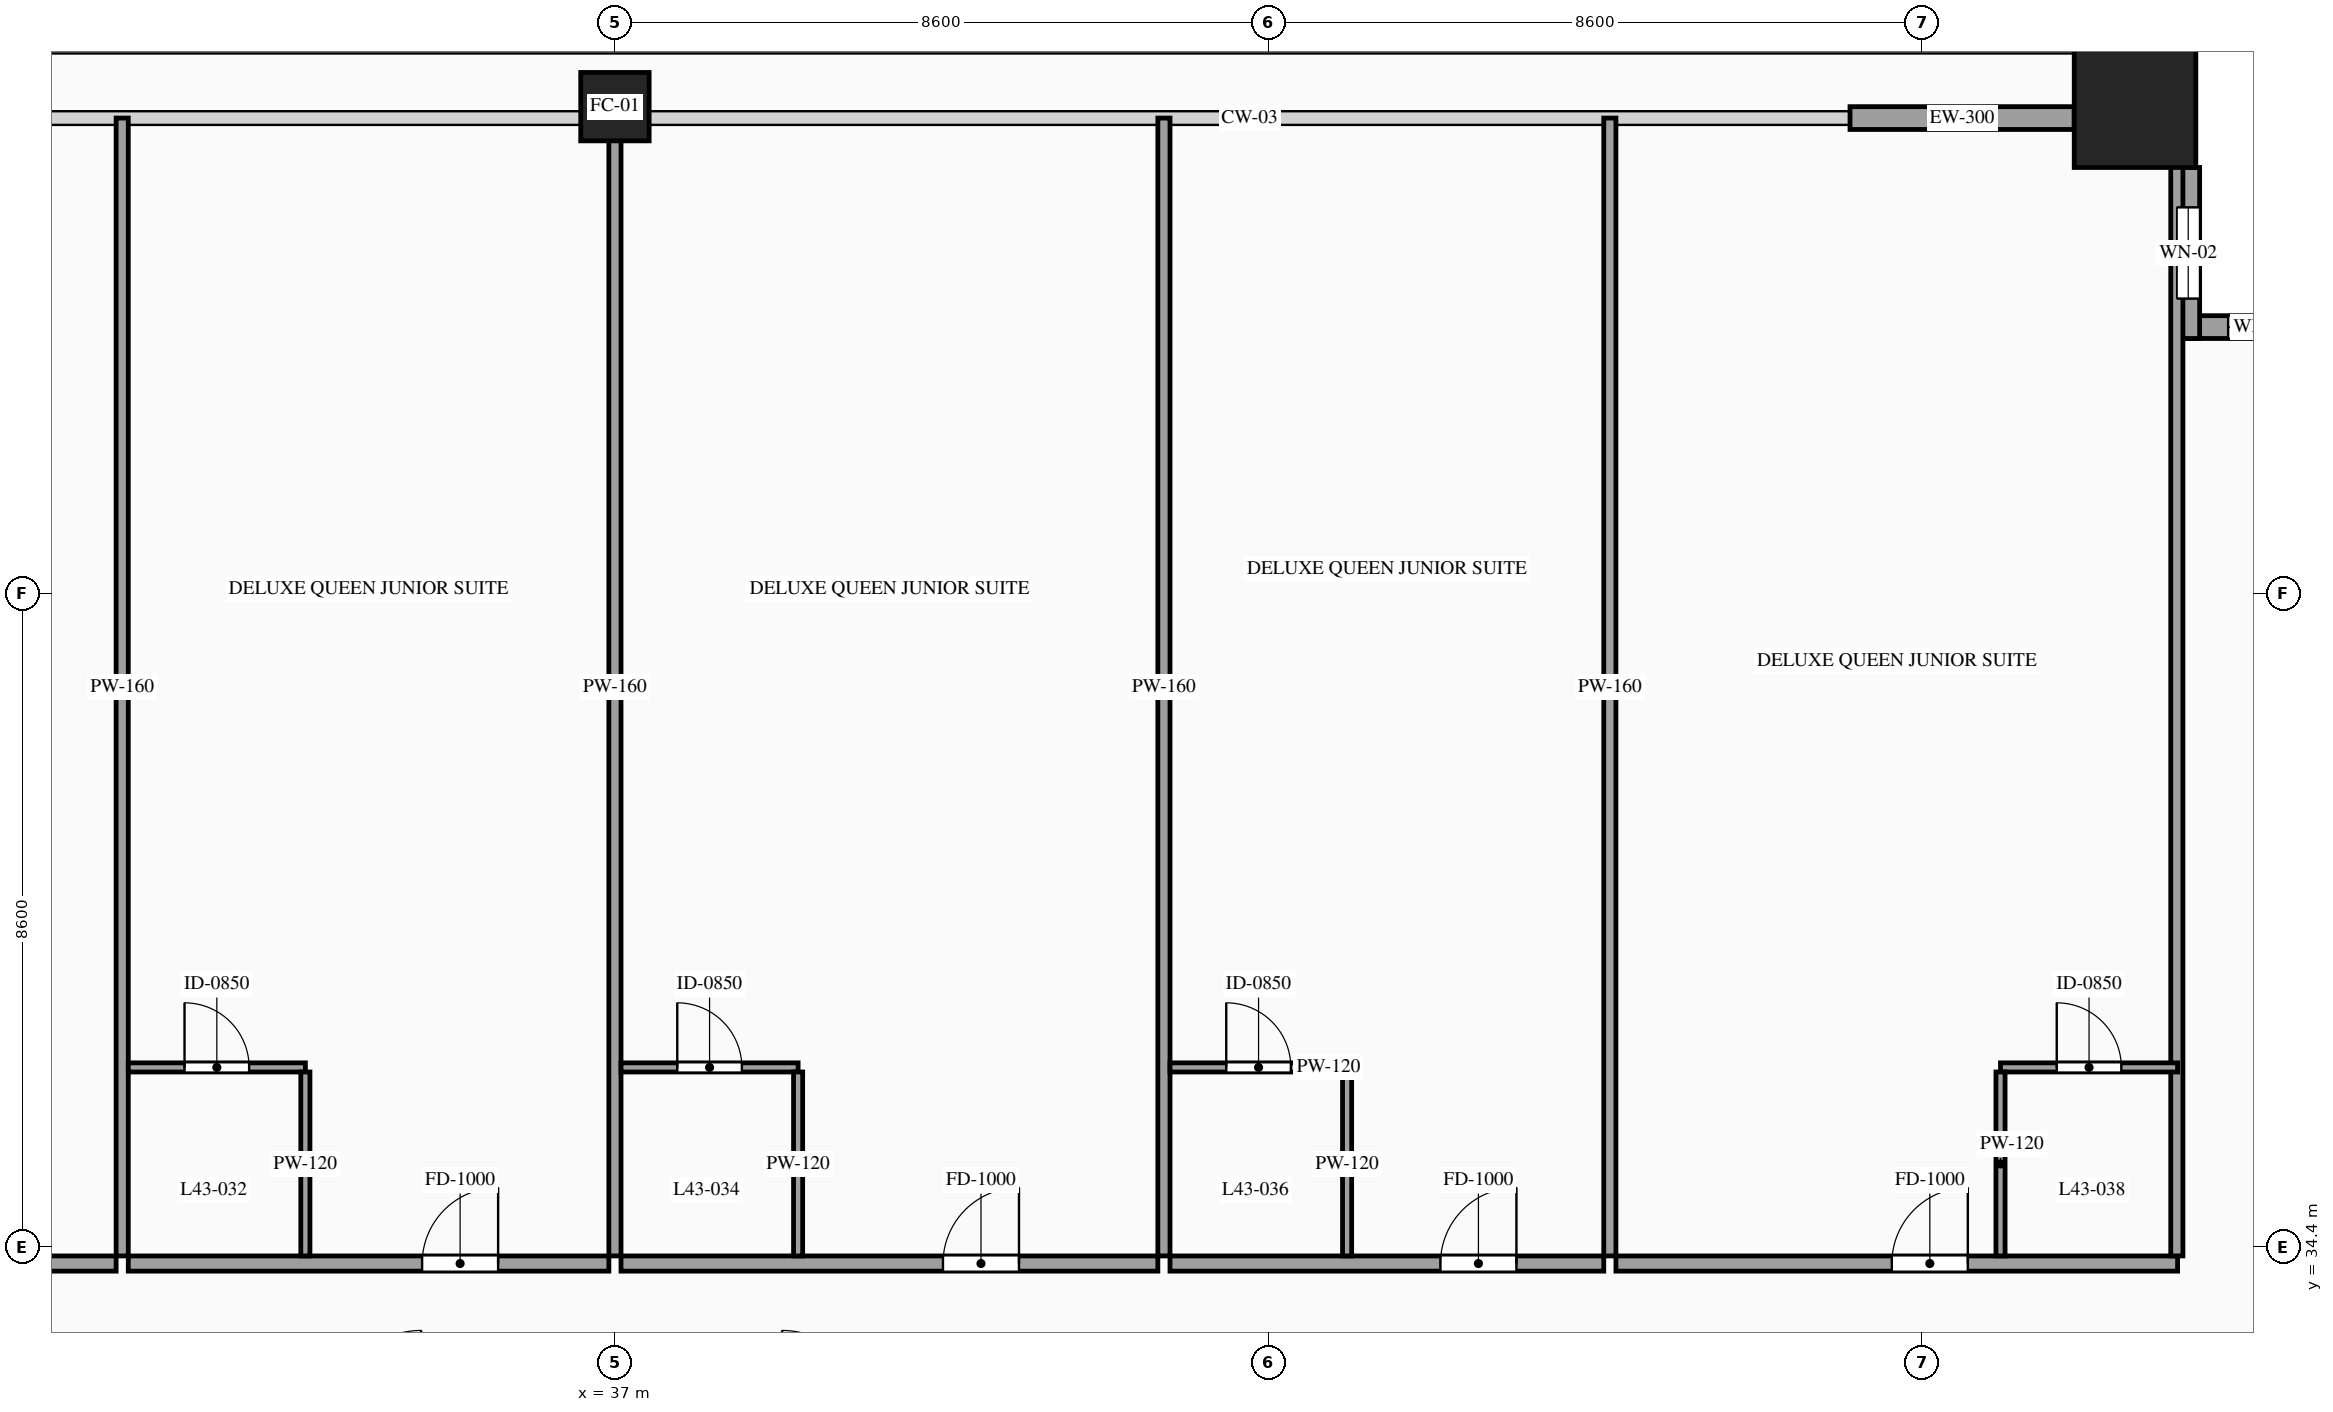
"""IFC4 building model, lengths in metres.
Left out: names, types, materials, properties, quantities, classifications, styles, units other than length and angle.
Written with IfcOpenShell. Run it as: python <this file> out.ifc"""

import sys

from ifc_helpers import new_model, si_unit, direction, frame, frame_2d, origin, origin_2d, place, context, subcontext, project, spatial, rectangle, hollow_rectangle, extrude, source, transform, mapped, element, fill, save


model = new_model("IFC4")
c1 = context("Model", 3, precision=1e-05, world=origin(), true_north=direction((0.0, 1.0)))
c2 = subcontext(c1, "Body", "Model", "MODEL_VIEW")
j1 = project(units=[si_unit("LENGTHUNIT", "METRE"), si_unit("PLANEANGLEUNIT", "RADIAN")], contexts=[c1])
p1 = place(None, origin())
s1 = spatial("IfcSite", under=j1, at=p1, CompositionType="ELEMENT")
p2 = place(p1, origin())
s2 = spatial("IfcBuilding", under=s1, at=p2, CompositionType="ELEMENT")
p3 = place(p2, frame((0.0, 0.0, 163.2)))
s3 = spatial("IfcBuildingStorey", under=s2, at=p3, CompositionType="ELEMENT", Elevation=163.2)
m1 = source(origin(), c2, "Body", "SweptSolid", [
    extrude(hollow_rectangle(XDim=0.9, YDim=0.9, WallThickness=0.042, at=origin_2d()), origin(), (0.0, 0.0, 1.0), 3.3),
])
p4 = place(p3, frame((37.0, 49.4, 0.0), z_axis=(0.0, 0.0, 1.0), x_axis=(1.0, 0.0, 0.0)))
e1 = element("IfcColumn", 1, at=p4, inside=s3, PredefinedType="COLUMN", context=c2, shape_type="MappedRepresentation", body=[
    mapped(m1, transform((0.0, 0.0, 0.0), scale=1.0)),
])
m2 = source(origin(), c2, "Body", "SweptSolid", [
    extrude(hollow_rectangle(XDim=1.6, YDim=1.6, WallThickness=0.07, at=origin_2d()), origin(), (0.0, 0.0, 1.0), 3.3),
])
p5 = place(p3, frame((57.0, 49.4, 0.0), z_axis=(0.0, 0.0, 1.0), x_axis=(1.0, 0.0, 0.0)))
e2 = element("IfcColumn", 2, at=p5, inside=s3, PredefinedType="COLUMN", context=c2, shape_type="MappedRepresentation", body=[
    mapped(m2, transform((0.0, 0.0, 0.0), scale=1.0)),
])
p6 = place(p3, frame((59.8, 46.5, 0.0), z_axis=(0.0, 0.0, 1.0), x_axis=(-1.0, 0.0, 0.0)))
e3 = element("IfcWall", 3, at=p6, inside=s3, PredefinedType="SOLIDWALL", context=c2, shape_type="SweptSolid", body=[
    extrude(rectangle(XDim=2.25, YDim=0.3, at=frame_2d((1.125, 0.0))), origin(), (0.0, 0.0, 1.0), 3.3),
])
p7 = place(p6, frame((0.675, 0.0, 0.85)))
e4 = element("IfcOpeningElement", 4, at=p7, cuts=e3, PredefinedType="OPENING", context=c2, shape_type="SweptSolid", body=[
    extrude(rectangle(XDim=0.9, YDim=1.5, at=frame_2d((0.45, 0.75))), frame((0.0, 0.165, 0.0), z_axis=(0.0, -1.0, 0.0), x_axis=(1.0, 0.0, 0.0)), (0.0, 0.0, 1.0), 0.33),
])
p8 = place(p3, frame((57.7, 46.35, 0.0), z_axis=(0.0, 0.0, 1.0), x_axis=(0.0, 1.0, 0.0)))
e5 = element("IfcWall", 5, at=p8, inside=s3, PredefinedType="SOLIDWALL", context=c2, shape_type="SweptSolid", body=[
    extrude(rectangle(XDim=2.25, YDim=0.3, at=frame_2d((1.125, 0.0))), origin(), (0.0, 0.0, 1.0), 3.3),
])
p9 = place(p8, frame((0.525, 0.0, 0.85)))
e6 = element("IfcOpeningElement", 6, at=p9, cuts=e5, PredefinedType="OPENING", context=c2, shape_type="SweptSolid", body=[
    extrude(rectangle(XDim=1.2, YDim=2.1, at=frame_2d((0.6, 1.05))), frame((0.0, 0.165, 0.0), z_axis=(0.0, -1.0, 0.0), x_axis=(1.0, 0.0, 0.0)), (0.0, 0.0, 1.0), 0.33),
])
m3 = source(origin(), c2, "Body", "SweptSolid", [
    extrude(rectangle(XDim=2.95, YDim=0.3, at=frame_2d((1.475, 0.0))), origin(), (0.0, 0.0, 1.0), 2.695),
])
p10 = place(p3, frame((53.25, 49.25, 0.0), z_axis=(0.0, 0.0, 1.0), x_axis=(1.0, 0.0, 0.0)))
e7 = element("IfcWall", 7, at=p10, inside=s3, PredefinedType="SOLIDWALL", context=c2, shape_type="MappedRepresentation", body=[
    mapped(m3, transform((0.0, 0.0, 0.0), scale=1.0)),
])
p11 = place(p3, frame((22.757, 34.18, 0.0), z_axis=(0.0, 0.0, 1.0), x_axis=(1.0, 0.0, 0.0)))
e8 = element("IfcWall", 8, at=p11, inside=s3, PredefinedType="PARTITIONING", context=c2, shape_type="SweptSolid", body=[
    extrude(rectangle(XDim=7.68, YDim=0.2, at=frame_2d((3.84, 0.0))), origin(), (0.0, 0.0, 1.0), 3.3),
])
p12 = place(p11, frame((4.545, 0.0, 0.0)))
e9 = element("IfcOpeningElement", 9, at=p12, cuts=e8, PredefinedType="OPENING", context=c2, shape_type="SweptSolid", body=[
    extrude(rectangle(XDim=1.0, YDim=2.2, at=frame_2d((0.5, 1.1))), frame((0.0, 0.115, 0.0), z_axis=(0.0, -1.0, 0.0), x_axis=(1.0, 0.0, 0.0)), (0.0, 0.0, 1.0), 0.23),
])
m4 = source(origin(), c2, "Body", "SweptSolid", [
    extrude(rectangle(XDim=14.97, YDim=0.16, at=frame_2d((7.485, 0.0))), origin(), (0.0, 0.0, 1.0), 3.3),
])
p13 = place(p3, frame((30.517, 34.28, 0.0), z_axis=(0.0, 0.0, 1.0), x_axis=(0.0, 1.0, 0.0)))
e10 = element("IfcWall", 10, at=p13, inside=s3, PredefinedType="PARTITIONING", context=c2, shape_type="MappedRepresentation", body=[
    mapped(m4, transform((0.0, 0.0, 0.0), scale=1.0)),
])
p14 = place(p3, frame((30.597, 34.18, 0.0), z_axis=(0.0, 0.0, 1.0), x_axis=(1.0, 0.0, 0.0)))
e11 = element("IfcWall", 11, at=p14, inside=s3, PredefinedType="PARTITIONING", context=c2, shape_type="SweptSolid", body=[
    extrude(rectangle(XDim=6.323, YDim=0.2, at=frame_2d((3.162, 0.0))), origin(), (0.0, 0.0, 1.0), 3.3),
])
p15 = place(p14, frame((3.866, 0.0, 0.0)))
e12 = element("IfcOpeningElement", 12, at=p15, cuts=e11, PredefinedType="OPENING", context=c2, shape_type="SweptSolid", body=[
    extrude(rectangle(XDim=1.0, YDim=2.2, at=frame_2d((0.5, 1.1))), frame((0.0, 0.115, 0.0), z_axis=(0.0, -1.0, 0.0), x_axis=(1.0, 0.0, 0.0)), (0.0, 0.0, 1.0), 0.23),
])
m5 = source(origin(), c2, "Body", "SweptSolid", [
    extrude(rectangle(XDim=14.97, YDim=0.16, at=frame_2d((7.485, 0.0))), origin(), (0.0, 0.0, 1.0), 1.695),
])
p16 = place(p3, frame((37.0, 34.28, 0.0), z_axis=(0.0, 0.0, 1.0), x_axis=(0.0, 1.0, 0.0)))
e13 = element("IfcWall", 13, at=p16, inside=s3, PredefinedType="PARTITIONING", context=c2, shape_type="MappedRepresentation", body=[
    mapped(m5, transform((0.0, 0.0, 0.0), scale=1.0)),
])
p17 = place(p3, frame((30.597, 36.76, 0.0), z_axis=(0.0, 0.0, 1.0), x_axis=(1.0, 0.0, 0.0)))
e14 = element("IfcWall", 14, at=p17, inside=s3, PredefinedType="PARTITIONING", context=c2, shape_type="SweptSolid", body=[
    extrude(rectangle(XDim=2.33, YDim=0.12, at=frame_2d((1.165, 0.0))), origin(), (0.0, 0.0, 1.0), 3.3),
])
p18 = place(p17, frame((0.74, 0.0, 0.0)))
e15 = element("IfcOpeningElement", 15, at=p18, cuts=e14, PredefinedType="OPENING", context=c2, shape_type="SweptSolid", body=[
    extrude(rectangle(XDim=0.85, YDim=2.1, at=frame_2d((0.425, 1.05))), frame((0.0, 0.075, 0.0), z_axis=(0.0, -1.0, 0.0), x_axis=(1.0, 0.0, 0.0)), (0.0, 0.0, 1.0), 0.15),
])
m6 = source(origin(), c2, "Body", "SweptSolid", [
    extrude(rectangle(XDim=2.42, YDim=0.12, at=frame_2d((1.21, 0.0))), origin(), (0.0, 0.0, 1.0), 3.3),
])
p19 = place(p3, frame((32.927, 34.28, 0.0), z_axis=(0.0, 0.0, 1.0), x_axis=(0.0, 1.0, 0.0)))
e16 = element("IfcWall", 16, at=p19, inside=s3, PredefinedType="PARTITIONING", context=c2, shape_type="MappedRepresentation", body=[
    mapped(m6, transform((0.0, 0.0, 0.0), scale=1.0)),
])
p20 = place(p3, frame((37.08, 34.18, 0.0), z_axis=(0.0, 0.0, 1.0), x_axis=(1.0, 0.0, 0.0)))
e17 = element("IfcWall", 17, at=p20, inside=s3, PredefinedType="PARTITIONING", context=c2, shape_type="SweptSolid", body=[
    extrude(rectangle(XDim=7.063, YDim=0.2, at=frame_2d((3.531, 0.0))), origin(), (0.0, 0.0, 1.0), 3.3),
])
p21 = place(p20, frame((4.236, 0.0, 0.0)))
e18 = element("IfcOpeningElement", 18, at=p21, cuts=e17, PredefinedType="OPENING", context=c2, shape_type="SweptSolid", body=[
    extrude(rectangle(XDim=1.0, YDim=2.2, at=frame_2d((0.5, 1.1))), frame((0.0, 0.115, 0.0), z_axis=(0.0, -1.0, 0.0), x_axis=(1.0, 0.0, 0.0)), (0.0, 0.0, 1.0), 0.23),
])
p22 = place(p3, frame((44.223, 34.28, 0.0), z_axis=(0.0, 0.0, 1.0), x_axis=(0.0, 1.0, 0.0)))
e19 = element("IfcWall", 19, at=p22, inside=s3, PredefinedType="PARTITIONING", context=c2, shape_type="MappedRepresentation", body=[
    mapped(m4, transform((0.0, 0.0, 0.0), scale=1.0)),
])
p23 = place(p3, frame((37.08, 36.76, 0.0), z_axis=(0.0, 0.0, 1.0), x_axis=(1.0, 0.0, 0.0)))
e20 = element("IfcWall", 20, at=p23, inside=s3, PredefinedType="PARTITIONING", context=c2, shape_type="SweptSolid", body=[
    extrude(rectangle(XDim=2.33, YDim=0.12, at=frame_2d((1.165, 0.0))), origin(), (0.0, 0.0, 1.0), 3.3),
])
p24 = place(p23, frame((0.74, 0.0, 0.0)))
e21 = element("IfcOpeningElement", 21, at=p24, cuts=e20, PredefinedType="OPENING", context=c2, shape_type="SweptSolid", body=[
    extrude(rectangle(XDim=0.85, YDim=2.1, at=frame_2d((0.425, 1.05))), frame((0.0, 0.075, 0.0), z_axis=(0.0, -1.0, 0.0), x_axis=(1.0, 0.0, 0.0)), (0.0, 0.0, 1.0), 0.15),
])
p25 = place(p3, frame((39.41, 34.28, 0.0), z_axis=(0.0, 0.0, 1.0), x_axis=(0.0, 1.0, 0.0)))
e22 = element("IfcWall", 22, at=p25, inside=s3, PredefinedType="PARTITIONING", context=c2, shape_type="MappedRepresentation", body=[
    mapped(m6, transform((0.0, 0.0, 0.0), scale=1.0)),
])
p26 = place(p3, frame((44.303, 34.18, 0.0), z_axis=(0.0, 0.0, 1.0), x_axis=(1.0, 0.0, 0.0)))
e23 = element("IfcWall", 23, at=p26, inside=s3, PredefinedType="PARTITIONING", context=c2, shape_type="SweptSolid", body=[
    extrude(rectangle(XDim=5.707, YDim=0.2, at=frame_2d((2.854, 0.0))), origin(), (0.0, 0.0, 1.0), 3.3),
])
p27 = place(p26, frame((3.558, 0.0, 0.0)))
e24 = element("IfcOpeningElement", 24, at=p27, cuts=e23, PredefinedType="OPENING", context=c2, shape_type="SweptSolid", body=[
    extrude(rectangle(XDim=1.0, YDim=2.2, at=frame_2d((0.5, 1.1))), frame((0.0, 0.115, 0.0), z_axis=(0.0, -1.0, 0.0), x_axis=(1.0, 0.0, 0.0)), (0.0, 0.0, 1.0), 0.23),
])
p28 = place(p3, frame((50.09, 34.28, 0.0), z_axis=(0.0, 0.0, 1.0), x_axis=(0.0, 1.0, 0.0)))
e25 = element("IfcWall", 25, at=p28, inside=s3, PredefinedType="PARTITIONING", context=c2, shape_type="MappedRepresentation", body=[
    mapped(m4, transform((0.0, 0.0, 0.0), scale=1.0)),
])
p29 = place(p3, frame((44.303, 36.76, 0.0), z_axis=(0.0, 0.0, 1.0), x_axis=(1.0, 0.0, 0.0)))
e26 = element("IfcWall", 26, at=p29, inside=s3, PredefinedType="PARTITIONING", context=c2, shape_type="SweptSolid", body=[
    extrude(rectangle(XDim=2.33, YDim=0.12, at=frame_2d((1.165, 0.0))), origin(), (0.0, 0.0, 1.0), 3.3),
])
p30 = place(p29, frame((0.74, 0.0, 0.0)))
e27 = element("IfcOpeningElement", 27, at=p30, cuts=e26, PredefinedType="OPENING", context=c2, shape_type="SweptSolid", body=[
    extrude(rectangle(XDim=0.85, YDim=2.1, at=frame_2d((0.425, 1.05))), frame((0.0, 0.075, 0.0), z_axis=(0.0, -1.0, 0.0), x_axis=(1.0, 0.0, 0.0)), (0.0, 0.0, 1.0), 0.15),
])
p31 = place(p3, frame((46.633, 34.28, 0.0), z_axis=(0.0, 0.0, 1.0), x_axis=(0.0, 1.0, 0.0)))
e28 = element("IfcWall", 28, at=p31, inside=s3, PredefinedType="PARTITIONING", context=c2, shape_type="MappedRepresentation", body=[
    mapped(m6, transform((0.0, 0.0, 0.0), scale=1.0)),
])
p32 = place(p3, frame((50.17, 34.18, 0.0), z_axis=(0.0, 0.0, 1.0), x_axis=(1.0, 0.0, 0.0)))
e29 = element("IfcWall", 29, at=p32, inside=s3, PredefinedType="PARTITIONING", context=c2, shape_type="SweptSolid", body=[
    extrude(rectangle(XDim=7.39, YDim=0.2, at=frame_2d((3.695, 0.0))), origin(), (0.0, 0.0, 1.0), 3.3),
])
p33 = place(p32, frame((3.63, 0.0, 0.0)))
e30 = element("IfcOpeningElement", 30, at=p33, cuts=e29, PredefinedType="OPENING", context=c2, shape_type="SweptSolid", body=[
    extrude(rectangle(XDim=1.0, YDim=2.2, at=frame_2d((0.5, 1.1))), frame((0.0, 0.115, 0.0), z_axis=(0.0, -1.0, 0.0), x_axis=(1.0, 0.0, 0.0)), (0.0, 0.0, 1.0), 0.23),
])
m7 = source(origin(), c2, "Body", "SweptSolid", [
    extrude(rectangle(XDim=14.82, YDim=0.16, at=frame_2d((7.41, 0.0))), origin(), (0.0, 0.0, 1.0), 3.3),
])
p34 = place(p3, frame((57.55, 34.28, 0.0), z_axis=(0.0, 0.0, 1.0), x_axis=(0.0, 1.0, 0.0)))
e31 = element("IfcWall", 31, at=p34, inside=s3, PredefinedType="PARTITIONING", context=c2, shape_type="MappedRepresentation", body=[
    mapped(m7, transform((0.0, 0.0, 0.0), scale=1.0)),
])
p35 = place(p3, frame((55.23, 36.76, 0.0), z_axis=(0.0, 0.0, 1.0), x_axis=(1.0, 0.0, 0.0)))
e32 = element("IfcWall", 32, at=p35, inside=s3, PredefinedType="PARTITIONING", context=c2, shape_type="SweptSolid", body=[
    extrude(rectangle(XDim=2.33, YDim=0.12, at=frame_2d((1.165, 0.0))), origin(), (0.0, 0.0, 1.0), 3.3),
])
p36 = place(p35, frame((0.74, 0.0, 0.0)))
e33 = element("IfcOpeningElement", 33, at=p36, cuts=e32, PredefinedType="OPENING", context=c2, shape_type="SweptSolid", body=[
    extrude(rectangle(XDim=0.85, YDim=2.1, at=frame_2d((0.425, 1.05))), frame((0.0, 0.075, 0.0), z_axis=(0.0, -1.0, 0.0), x_axis=(1.0, 0.0, 0.0)), (0.0, 0.0, 1.0), 0.15),
])
p37 = place(p3, frame((55.23, 34.28, 0.0), z_axis=(0.0, 0.0, 1.0), x_axis=(0.0, 1.0, 0.0)))
e34 = element("IfcWall", 34, at=p37, inside=s3, PredefinedType="PARTITIONING", context=c2, shape_type="MappedRepresentation", body=[
    mapped(m6, transform((0.0, 0.0, 0.0), scale=1.0)),
])
m8 = source(origin(), c2, "Body", "SweptSolid", [
    extrude(rectangle(XDim=0.9, YDim=1.5, at=frame_2d((0.45, 0.75))), frame((0.0, 0.03, 0.0), z_axis=(0.0, -1.0, 0.0), x_axis=(1.0, 0.0, 0.0)), (0.0, 0.0, 1.0), 0.06),
])
p38 = place(p7, origin())
e35 = element("IfcWindow", 35, at=p38, inside=s3, PartitioningType="SINGLE_PANEL", PredefinedType="WINDOW", context=c2, shape_type="MappedRepresentation", body=[
    mapped(m8, transform((0.0, 0.0, 0.0), scale=1.0)),
])
fill(e4, e35)
m9 = source(origin(), c2, "Body", "SweptSolid", [
    extrude(rectangle(XDim=1.2, YDim=2.1, at=frame_2d((0.6, 1.05))), frame((0.0, 0.03, 0.0), z_axis=(0.0, -1.0, 0.0), x_axis=(1.0, 0.0, 0.0)), (0.0, 0.0, 1.0), 0.06),
])
p39 = place(p9, origin())
e36 = element("IfcWindow", 36, at=p39, inside=s3, PartitioningType="SINGLE_PANEL", PredefinedType="WINDOW", context=c2, shape_type="MappedRepresentation", body=[
    mapped(m9, transform((0.0, 0.0, 0.0), scale=1.0)),
])
fill(e6, e36)
m10 = source(origin(), c2, "Body", "SweptSolid", [
    extrude(rectangle(XDim=1.0, YDim=2.2, at=frame_2d((0.5, 1.1))), frame((0.0, 0.025, 0.0), z_axis=(0.0, -1.0, 0.0), x_axis=(1.0, 0.0, 0.0)), (0.0, 0.0, 1.0), 0.05),
])
p40 = place(p15, origin())
e37 = element("IfcDoor", 37, at=p40, inside=s3, OperationType="SINGLE_SWING_RIGHT", PredefinedType="DOOR", context=c2, shape_type="MappedRepresentation", body=[
    mapped(m10, transform((0.0, 0.0, 0.0), scale=1.0)),
])
fill(e12, e37)
m11 = source(origin(), c2, "Body", "SweptSolid", [
    extrude(rectangle(XDim=0.85, YDim=2.1, at=frame_2d((0.425, 1.05))), frame((0.0, 0.025, 0.0), z_axis=(0.0, -1.0, 0.0), x_axis=(1.0, 0.0, 0.0)), (0.0, 0.0, 1.0), 0.05),
])
p41 = place(p18, origin())
e38 = element("IfcDoor", 38, at=p41, inside=s3, OperationType="SINGLE_SWING_LEFT", PredefinedType="DOOR", context=c2, shape_type="MappedRepresentation", body=[
    mapped(m11, transform((0.0, 0.0, 0.0), scale=1.0)),
])
fill(e15, e38)
p42 = place(p21, origin())
e39 = element("IfcDoor", 39, at=p42, inside=s3, OperationType="SINGLE_SWING_RIGHT", PredefinedType="DOOR", context=c2, shape_type="MappedRepresentation", body=[
    mapped(m10, transform((0.0, 0.0, 0.0), scale=1.0)),
])
fill(e18, e39)
p43 = place(p24, origin())
e40 = element("IfcDoor", 40, at=p43, inside=s3, OperationType="SINGLE_SWING_LEFT", PredefinedType="DOOR", context=c2, shape_type="MappedRepresentation", body=[
    mapped(m11, transform((0.0, 0.0, 0.0), scale=1.0)),
])
fill(e21, e40)
p44 = place(p27, origin())
e41 = element("IfcDoor", 41, at=p44, inside=s3, OperationType="SINGLE_SWING_RIGHT", PredefinedType="DOOR", context=c2, shape_type="MappedRepresentation", body=[
    mapped(m10, transform((0.0, 0.0, 0.0), scale=1.0)),
])
fill(e24, e41)
p45 = place(p30, origin())
e42 = element("IfcDoor", 42, at=p45, inside=s3, OperationType="SINGLE_SWING_LEFT", PredefinedType="DOOR", context=c2, shape_type="MappedRepresentation", body=[
    mapped(m11, transform((0.0, 0.0, 0.0), scale=1.0)),
])
fill(e27, e42)
p46 = place(p33, origin())
e43 = element("IfcDoor", 43, at=p46, inside=s3, OperationType="SINGLE_SWING_RIGHT", PredefinedType="DOOR", context=c2, shape_type="MappedRepresentation", body=[
    mapped(m10, transform((0.0, 0.0, 0.0), scale=1.0)),
])
fill(e30, e43)
p47 = place(p36, origin())
e44 = element("IfcDoor", 44, at=p47, inside=s3, OperationType="SINGLE_SWING_LEFT", PredefinedType="DOOR", context=c2, shape_type="MappedRepresentation", body=[
    mapped(m11, transform((0.0, 0.0, 0.0), scale=1.0)),
])
fill(e33, e44)
save(model, sys.argv[1])
